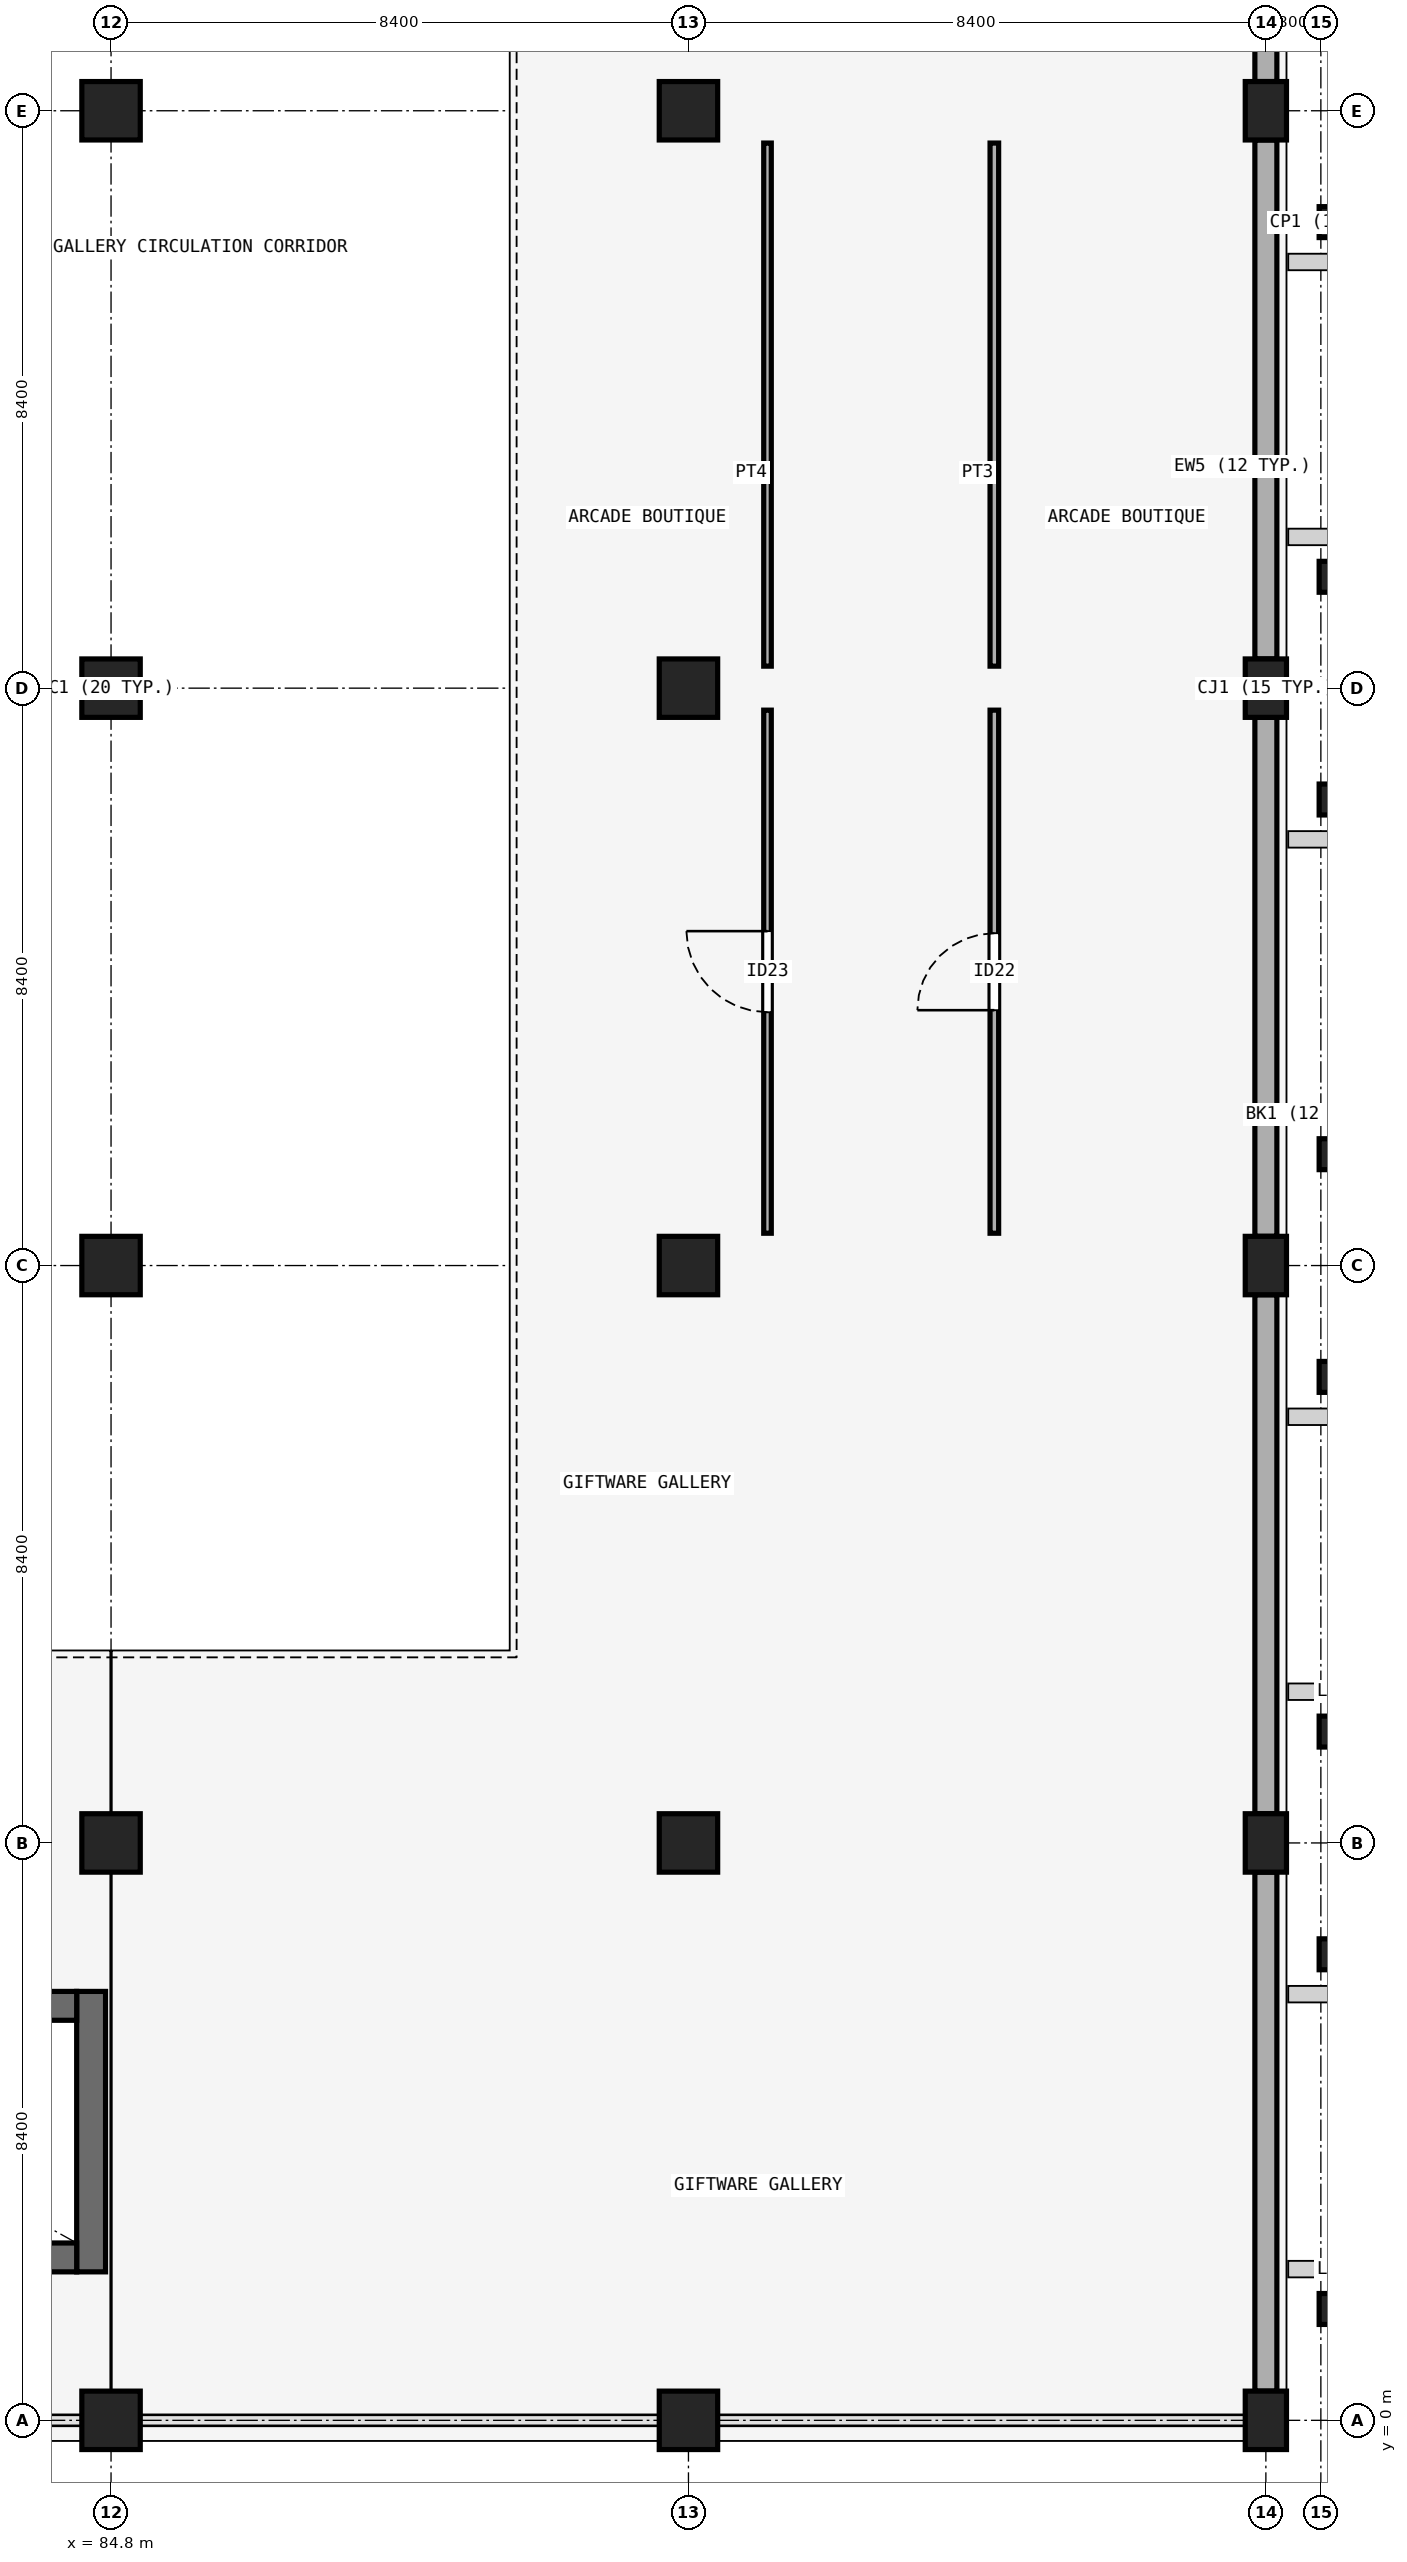
"""IFC4 building model, lengths in metres.
Left out: names, types, materials, properties, quantities, classifications, styles, units other than length and angle.
Written with IfcOpenShell. Run it as: python <this file> out.ifc"""

import sys

from ifc_helpers import new_model, si_unit, direction, frame, frame_2d, origin, origin_2d, place, context, subcontext, project, spatial, rectangle, extrude, element, fill, save


model = new_model("IFC4")
c1 = context("Model", 3, precision=1e-05, world=origin(), true_north=direction((0.0, 1.0)))
c2 = subcontext(c1, "Body", "Model", "MODEL_VIEW")
j1 = project(units=[si_unit("LENGTHUNIT", "METRE"), si_unit("PLANEANGLEUNIT", "RADIAN")], contexts=[c1])
p1 = place(None, origin())
s1 = spatial("IfcSite", under=j1, at=p1, CompositionType="ELEMENT")
p2 = place(p1, origin())
s2 = spatial("IfcBuilding", under=s1, at=p2, CompositionType="ELEMENT")
p3 = place(p2, frame((0.0, 0.0, 9.9)))
s3 = spatial("IfcBuildingStorey", under=s2, at=p3, CompositionType="ELEMENT", Elevation=9.9)
for number, where, z_axis, x_axis in (
    (1, (84.8, 0.0, 0.0), (0.0, 0.0, 1.0), (1.0, 0.0, 0.0)),
    (2, (93.2, 0.0, 0.0), (0.0, 0.0, 1.0), (1.0, 0.0, 0.0)),
):
    element("IfcColumn", number, at=place(p3, frame(where, z_axis=z_axis, x_axis=x_axis)), inside=s3, PredefinedType="COLUMN", context=c2, shape_type="SweptSolid", body=[
        extrude(rectangle(XDim=0.85, YDim=0.85, at=origin_2d()), origin(), (0.0, 0.0, 1.0), 4.5),
    ])
p4 = place(p3, frame((101.6, 0.0, 0.0), z_axis=(0.0, 0.0, 1.0), x_axis=(1.0, 0.0, 0.0)))
e3 = element("IfcColumn", 3, at=p4, inside=s3, PredefinedType="COLUMN", context=c2, shape_type="SweptSolid", body=[
    extrude(rectangle(XDim=0.6, YDim=0.85, at=origin_2d()), origin(), (0.0, 0.0, 1.0), 4.5),
])
for number, where, z_axis, x_axis in (
    (4, (84.8, 8.4, 0.0), (0.0, 0.0, 1.0), (1.0, 0.0, 0.0)),
    (5, (93.2, 8.4, 0.0), (0.0, 0.0, 1.0), (1.0, 0.0, 0.0)),
):
    element("IfcColumn", number, at=place(p3, frame(where, z_axis=z_axis, x_axis=x_axis)), inside=s3, PredefinedType="COLUMN", context=c2, shape_type="SweptSolid", body=[
        extrude(rectangle(XDim=0.85, YDim=0.85, at=origin_2d()), origin(), (0.0, 0.0, 1.0), 4.5),
    ])
p5 = place(p3, frame((101.6, 8.4, 0.0), z_axis=(0.0, 0.0, 1.0), x_axis=(1.0, 0.0, 0.0)))
e6 = element("IfcColumn", 6, at=p5, inside=s3, PredefinedType="COLUMN", context=c2, shape_type="SweptSolid", body=[
    extrude(rectangle(XDim=0.6, YDim=0.85, at=origin_2d()), origin(), (0.0, 0.0, 1.0), 4.5),
])
for number, where, z_axis, x_axis in (
    (7, (84.8, 16.8, 0.0), (0.0, 0.0, 1.0), (1.0, 0.0, 0.0)),
    (8, (93.2, 16.8, 0.0), (0.0, 0.0, 1.0), (1.0, 0.0, 0.0)),
):
    element("IfcColumn", number, at=place(p3, frame(where, z_axis=z_axis, x_axis=x_axis)), inside=s3, PredefinedType="COLUMN", context=c2, shape_type="SweptSolid", body=[
        extrude(rectangle(XDim=0.85, YDim=0.85, at=origin_2d()), origin(), (0.0, 0.0, 1.0), 4.5),
    ])
p6 = place(p3, frame((101.6, 16.8, 0.0), z_axis=(0.0, 0.0, 1.0), x_axis=(1.0, 0.0, 0.0)))
e9 = element("IfcColumn", 9, at=p6, inside=s3, PredefinedType="COLUMN", context=c2, shape_type="SweptSolid", body=[
    extrude(rectangle(XDim=0.6, YDim=0.85, at=origin_2d()), origin(), (0.0, 0.0, 1.0), 4.5),
])
for number, where, z_axis, x_axis in (
    (10, (84.8, 25.2, 0.0), (0.0, 0.0, 1.0), (1.0, 0.0, 0.0)),
    (11, (93.2, 25.2, 0.0), (0.0, 0.0, 1.0), (1.0, 0.0, 0.0)),
):
    element("IfcColumn", number, at=place(p3, frame(where, z_axis=z_axis, x_axis=x_axis)), inside=s3, PredefinedType="COLUMN", context=c2, shape_type="SweptSolid", body=[
        extrude(rectangle(XDim=0.85, YDim=0.85, at=origin_2d()), origin(), (0.0, 0.0, 1.0), 4.5),
    ])
p7 = place(p3, frame((101.6, 25.2, 0.0), z_axis=(0.0, 0.0, 1.0), x_axis=(1.0, 0.0, 0.0)))
e12 = element("IfcColumn", 12, at=p7, inside=s3, PredefinedType="COLUMN", context=c2, shape_type="SweptSolid", body=[
    extrude(rectangle(XDim=0.6, YDim=0.85, at=origin_2d()), origin(), (0.0, 0.0, 1.0), 4.5),
])
for number, where, z_axis, x_axis in (
    (13, (84.8, 33.6, 0.0), (0.0, 0.0, 1.0), (1.0, 0.0, 0.0)),
    (14, (93.2, 33.6, 0.0), (0.0, 0.0, 1.0), (1.0, 0.0, 0.0)),
):
    element("IfcColumn", number, at=place(p3, frame(where, z_axis=z_axis, x_axis=x_axis)), inside=s3, PredefinedType="COLUMN", context=c2, shape_type="SweptSolid", body=[
        extrude(rectangle(XDim=0.85, YDim=0.85, at=origin_2d()), origin(), (0.0, 0.0, 1.0), 4.5),
    ])
p8 = place(p3, frame((101.6, 33.6, 0.0), z_axis=(0.0, 0.0, 1.0), x_axis=(1.0, 0.0, 0.0)))
e15 = element("IfcColumn", 15, at=p8, inside=s3, PredefinedType="COLUMN", context=c2, shape_type="SweptSolid", body=[
    extrude(rectangle(XDim=0.6, YDim=0.85, at=origin_2d()), origin(), (0.0, 0.0, 1.0), 4.5),
])
for number, where, z_axis, x_axis in (
    (16, (102.65, 1.62, 0.0), (0.0, 0.0, 1.0), (0.0, 1.0, 0.0)),
    (17, (102.65, 6.78, 0.0), (0.0, 0.0, 1.0), (0.0, 1.0, 0.0)),
    (18, (102.65, 10.02, 0.0), (0.0, 0.0, 1.0), (0.0, 1.0, 0.0)),
    (19, (102.65, 15.18, 0.0), (0.0, 0.0, 1.0), (0.0, 1.0, 0.0)),
    (20, (102.65, 18.42, 0.0), (0.0, 0.0, 1.0), (0.0, 1.0, 0.0)),
    (21, (102.65, 23.58, 0.0), (0.0, 0.0, 1.0), (0.0, 1.0, 0.0)),
    (22, (102.65, 26.82, 0.0), (0.0, 0.0, 1.0), (0.0, 1.0, 0.0)),
    (23, (102.65, 31.98, 0.0), (0.0, 0.0, 1.0), (0.0, 1.0, 0.0)),
):
    element("IfcColumn", number, at=place(p3, frame(where, z_axis=z_axis, x_axis=x_axis)), inside=s3, PredefinedType="PILASTER", context=c2, shape_type="SweptSolid", body=[
        extrude(rectangle(XDim=0.45, YDim=0.55, at=origin_2d()), origin(), (0.0, 0.0, 1.0), 4.5),
    ])
for number, where, z_axis, x_axis in (
    (24, (101.6, 0.425, 0.0), (0.0, 0.0, 1.0), (0.0, 1.0, 0.0)),
    (25, (101.6, 8.825, 0.0), (0.0, 0.0, 1.0), (0.0, 1.0, 0.0)),
):
    element("IfcWall", number, at=place(p3, frame(where, z_axis=z_axis, x_axis=x_axis)), inside=s3, PredefinedType="SOLIDWALL", context=c2, shape_type="SweptSolid", body=[
        extrude(rectangle(XDim=7.55, YDim=0.32, at=frame_2d((3.775, 0.0))), origin(), (0.0, 0.0, 1.0), 3.49),
    ])
p9 = place(p3, frame((101.6, 17.225, 0.0), z_axis=(0.0, 0.0, 1.0), x_axis=(0.0, 1.0, 0.0)))
e26 = element("IfcWall", 26, at=p9, inside=s3, PredefinedType="SOLIDWALL", context=c2, shape_type="SweptSolid", body=[
    extrude(rectangle(XDim=7.55, YDim=0.32, at=frame_2d((3.775, 0.0))), origin(), (0.0, 0.0, 1.0), 3.49),
])
for number, where, z_axis, x_axis in (
    (27, (101.6, 25.625, 0.0), (0.0, 0.0, 1.0), (0.0, 1.0, 0.0)),
    (28, (101.6, 34.025, 0.0), (0.0, 0.0, 1.0), (0.0, 1.0, 0.0)),
):
    element("IfcWall", number, at=place(p3, frame(where, z_axis=z_axis, x_axis=x_axis)), inside=s3, PredefinedType="SOLIDWALL", context=c2, shape_type="SweptSolid", body=[
        extrude(rectangle(XDim=7.55, YDim=0.32, at=frame_2d((3.775, 0.0))), origin(), (0.0, 0.0, 1.0), 3.49),
    ])
p10 = place(p3, frame((84.51, 2.16, 0.0), z_axis=(0.0, 0.0, 1.0), x_axis=(0.0, 1.0, 0.0)))
e29 = element("IfcWall", 29, at=p10, inside=s3, PredefinedType="SHEAR", context=c2, shape_type="SweptSolid", body=[
    extrude(rectangle(XDim=4.08, YDim=0.42, at=frame_2d((2.04, 0.0))), origin(), (0.0, 0.0, 1.0), 4.24),
])
for number, where, z_axis, x_axis in (
    (30, (76.9, 2.37, 0.0), (0.0, 0.0, 1.0), (1.0, 0.0, 0.0)),
    (31, (76.9, 6.03, 0.0), (0.0, 0.0, 1.0), (1.0, 0.0, 0.0)),
):
    element("IfcWall", number, at=place(p3, frame(where, z_axis=z_axis, x_axis=x_axis)), inside=s3, PredefinedType="SHEAR", context=c2, shape_type="SweptSolid", body=[
        extrude(rectangle(XDim=7.4, YDim=0.42, at=frame_2d((3.7, 0.0))), origin(), (0.0, 0.0, 1.0), 4.24),
    ])
p11 = place(p3, frame((97.65, 17.27, 0.0), z_axis=(0.0, 0.0, 1.0), x_axis=(0.0, 1.0, 0.0)))
e32 = element("IfcWall", 32, at=p11, inside=s3, PredefinedType="PARTITIONING", context=c2, shape_type="SweptSolid", body=[
    extrude(rectangle(XDim=7.61, YDim=0.125, at=frame_2d((3.805, 0.0))), origin(), (0.0, 0.0, 1.0), 4.2),
])
p12 = place(p11, frame((3.245, 0.0, 0.0)))
e33 = element("IfcOpeningElement", 33, at=p12, cuts=e32, PredefinedType="OPENING", context=c2, shape_type="SweptSolid", body=[
    extrude(rectangle(XDim=1.12, YDim=2.46, at=frame_2d((0.56, 1.23))), frame((0.0, 0.073, 0.0), z_axis=(0.0, -1.0, 0.0), x_axis=(1.0, 0.0, 0.0)), (0.0, 0.0, 1.0), 0.145),
])
p13 = place(p3, frame((97.65, 25.52, 0.0), z_axis=(0.0, 0.0, 1.0), x_axis=(0.0, 1.0, 0.0)))
e34 = element("IfcWall", 34, at=p13, inside=s3, PredefinedType="PARTITIONING", context=c2, shape_type="SweptSolid", body=[
    extrude(rectangle(XDim=7.61, YDim=0.125, at=frame_2d((3.805, 0.0))), origin(), (0.0, 0.0, 1.0), 4.2),
])
p14 = place(p3, frame((94.35, 17.27, 0.0), z_axis=(0.0, 0.0, 1.0), x_axis=(0.0, 1.0, 0.0)))
e35 = element("IfcWall", 35, at=p14, inside=s3, PredefinedType="PARTITIONING", context=c2, shape_type="SweptSolid", body=[
    extrude(rectangle(XDim=7.61, YDim=0.11, at=frame_2d((3.805, 0.0))), origin(), (0.0, 0.0, 1.0), 4.2),
])
p15 = place(p14, frame((3.215, 0.0, 0.0)))
e36 = element("IfcOpeningElement", 36, at=p15, cuts=e35, PredefinedType="OPENING", context=c2, shape_type="SweptSolid", body=[
    extrude(rectangle(XDim=1.18, YDim=2.1, at=frame_2d((0.59, 1.05))), frame((0.0, 0.065, 0.0), z_axis=(0.0, -1.0, 0.0), x_axis=(1.0, 0.0, 0.0)), (0.0, 0.0, 1.0), 0.13),
])
p16 = place(p3, frame((94.35, 25.52, 0.0), z_axis=(0.0, 0.0, 1.0), x_axis=(0.0, 1.0, 0.0)))
e37 = element("IfcWall", 37, at=p16, inside=s3, PredefinedType="PARTITIONING", context=c2, shape_type="SweptSolid", body=[
    extrude(rectangle(XDim=7.61, YDim=0.11, at=frame_2d((3.805, 0.0))), origin(), (0.0, 0.0, 1.0), 4.2),
])
p17 = place(p12, origin())
e38 = element("IfcDoor", 38, at=p17, inside=s3, OperationType="SINGLE_SWING_LEFT", PredefinedType="DOOR", context=c2, shape_type="SweptSolid", body=[
    extrude(rectangle(XDim=1.12, YDim=2.46, at=frame_2d((0.56, 1.23))), frame((0.0, 0.025, 0.0), z_axis=(0.0, -1.0, 0.0), x_axis=(1.0, 0.0, 0.0)), (0.0, 0.0, 1.0), 0.05),
])
fill(e33, e38)
p18 = place(p15, origin())
e39 = element("IfcDoor", 39, at=p18, inside=s3, OperationType="SINGLE_SWING_RIGHT", PredefinedType="DOOR", context=c2, shape_type="SweptSolid", body=[
    extrude(rectangle(XDim=1.18, YDim=2.1, at=frame_2d((0.59, 1.05))), frame((0.0, 0.025, 0.0), z_axis=(0.0, -1.0, 0.0), x_axis=(1.0, 0.0, 0.0)), (0.0, 0.0, 1.0), 0.05),
])
fill(e36, e39)
save(model, sys.argv[1])
